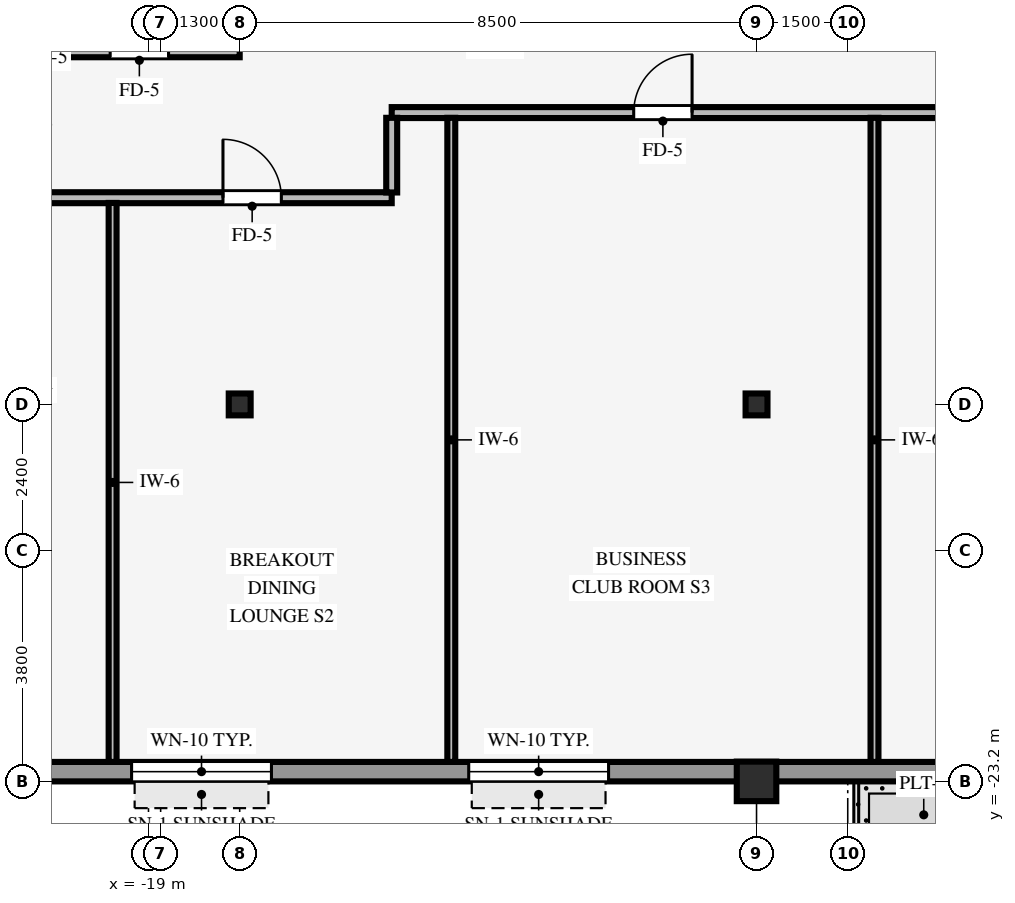
"""IFC4 building model, lengths in metres.
Left out: names, types, materials, properties, quantities, classifications, styles, units other than length and angle.
Written with IfcOpenShell. Run it as: python <this file> out.ifc"""

import sys

from ifc_helpers import new_model, si_unit, direction, frame, frame_2d, origin, origin_2d, place, context, subcontext, project, spatial, rectangle, hollow_rectangle, i_section, extrude, source, transform, mapped, element, fill, save


model = new_model("IFC4")
c1 = context("Model", 3, precision=1e-05, world=origin(), true_north=direction((0.0, 1.0)))
c2 = subcontext(c1, "Body", "Model", "MODEL_VIEW")
j1 = project(units=[si_unit("LENGTHUNIT", "METRE"), si_unit("PLANEANGLEUNIT", "RADIAN")], contexts=[c1])
p1 = place(None, origin())
s1 = spatial("IfcSite", under=j1, at=p1, CompositionType="ELEMENT")
p2 = place(p1, origin())
s2 = spatial("IfcBuilding", under=s1, at=p2, CompositionType="ELEMENT")
p3 = place(p2, frame((0.0, 0.0, 101.95)))
s3 = spatial("IfcBuildingStorey", under=s2, at=p3, CompositionType="ELEMENT", Elevation=101.95)
p4 = place(p3, frame((-9.0, -23.2, 0.0), z_axis=(0.0, 0.0, 1.0), x_axis=(1.0, 0.0, 0.0)))
e1 = element("IfcColumn", 1, at=p4, inside=s3, PredefinedType="COLUMN", context=c2, shape_type="SweptSolid", body=[
    extrude(hollow_rectangle(XDim=0.65, YDim=0.65, WallThickness=0.04, InnerFilletRadius=0.04, OuterFilletRadius=0.08, at=origin_2d()), origin(), (0.0, 0.0, 1.0), 3.37),
])
for number, where, z_axis, x_axis in (
    (2, (-17.5, -17.0, 0.0), (0.0, 0.0, 1.0), (1.0, 0.0, 0.0)),
    (3, (-9.0, -17.0, 0.0), (0.0, 0.0, 1.0), (1.0, 0.0, 0.0)),
):
    element("IfcColumn", number, at=place(p3, frame(where, z_axis=z_axis, x_axis=x_axis)), inside=s3, PredefinedType="COLUMN", context=c2, shape_type="SweptSolid", body=[
        extrude(i_section(OverallWidth=0.36, OverallDepth=0.36, WebThickness=0.021, FlangeThickness=0.021, FilletRadius=0.018, at=origin_2d()), origin(), (0.0, 0.0, 1.0), 3.37),
    ])
p5 = place(p3, frame((-21.9, -23.04, 0.0), z_axis=(0.0, 0.0, 1.0), x_axis=(1.0, 0.0, 0.0)))
e4 = element("IfcWall", 4, at=p5, inside=s3, PredefinedType="STANDARD", context=c2, shape_type="SweptSolid", body=[
    extrude(rectangle(XDim=43.8, YDim=0.32, at=frame_2d((21.9, 0.0))), origin(), (0.0, 0.0, 1.0), 2.705),
])
p6 = place(p5, frame((17.58, 0.0, 0.0), z_axis=(0.0, 0.0, 1.0), x_axis=(-1.0, 0.0, 0.0)))
e5 = element("IfcOpeningElement", 5, at=p6, cuts=e4, PredefinedType="OPENING", context=c2, shape_type="SweptSolid", body=[
    extrude(rectangle(XDim=0.98, YDim=2.15, at=frame_2d((0.49, 1.075))), frame((0.0, 0.17, 0.0), z_axis=(0.0, -1.0, 0.0), x_axis=(1.0, 0.0, 0.0)), (0.0, 0.0, 1.0), 0.34),
])
p7 = place(p5, frame((2.622, 0.0, 0.8)))
e6 = element("IfcOpeningElement", 6, at=p7, cuts=e4, PredefinedType="OPENING", context=c2, shape_type="SweptSolid", body=[
    extrude(rectangle(XDim=2.3, YDim=1.62, at=frame_2d((1.15, 0.81))), frame((0.0, 0.17, 0.0), z_axis=(0.0, -1.0, 0.0), x_axis=(1.0, 0.0, 0.0)), (0.0, 0.0, 1.0), 0.34),
])
p8 = place(p5, frame((8.167, 0.0, 0.8)))
e7 = element("IfcOpeningElement", 7, at=p8, cuts=e4, PredefinedType="OPENING", context=c2, shape_type="SweptSolid", body=[
    extrude(rectangle(XDim=2.3, YDim=1.62, at=frame_2d((1.15, 0.81))), frame((0.0, 0.17, 0.0), z_axis=(0.0, -1.0, 0.0), x_axis=(1.0, 0.0, 0.0)), (0.0, 0.0, 1.0), 0.34),
])
p9 = place(p5, frame((24.044, 0.0, 0.8)))
e8 = element("IfcOpeningElement", 8, at=p9, cuts=e4, PredefinedType="OPENING", context=c2, shape_type="SweptSolid", body=[
    extrude(rectangle(XDim=2.3, YDim=1.62, at=frame_2d((1.15, 0.81))), frame((0.0, 0.17, 0.0), z_axis=(0.0, -1.0, 0.0), x_axis=(1.0, 0.0, 0.0)), (0.0, 0.0, 1.0), 0.34),
])
p10 = place(p5, frame((34.233, 0.0, 0.8)))
e9 = element("IfcOpeningElement", 9, at=p10, cuts=e4, PredefinedType="OPENING", context=c2, shape_type="SweptSolid", body=[
    extrude(rectangle(XDim=2.3, YDim=1.62, at=frame_2d((1.15, 0.81))), frame((0.0, 0.17, 0.0), z_axis=(0.0, -1.0, 0.0), x_axis=(1.0, 0.0, 0.0)), (0.0, 0.0, 1.0), 0.34),
])
p11 = place(p5, frame((38.878, 0.0, 0.8)))
e10 = element("IfcOpeningElement", 10, at=p11, cuts=e4, PredefinedType="OPENING", context=c2, shape_type="SweptSolid", body=[
    extrude(rectangle(XDim=2.3, YDim=1.62, at=frame_2d((1.15, 0.81))), frame((0.0, 0.17, 0.0), z_axis=(0.0, -1.0, 0.0), x_axis=(1.0, 0.0, 0.0)), (0.0, 0.0, 1.0), 0.34),
])
p12 = place(p3, frame((-20.8, -13.6, 0.0), z_axis=(0.0, 0.0, 1.0), x_axis=(1.0, 0.0, 0.0)))
e11 = element("IfcWall", 11, at=p12, inside=s3, PredefinedType="PARTITIONING", context=c2, shape_type="SweptSolid", body=[
    extrude(rectangle(XDim=5.8, YDim=0.18, at=frame_2d((2.9, 0.0))), origin(), (0.0, 0.0, 1.0), 2.998),
])
p13 = place(p12, frame((3.025, 0.0, 0.0)))
e12 = element("IfcOpeningElement", 12, at=p13, cuts=e11, PredefinedType="OPENING", context=c2, shape_type="SweptSolid", body=[
    extrude(rectangle(XDim=0.96, YDim=2.1, at=frame_2d((0.48, 1.05))), frame((0.0, 0.1, 0.0), z_axis=(0.0, -1.0, 0.0), x_axis=(1.0, 0.0, 0.0)), (0.0, 0.0, 1.0), 0.2),
])
p14 = place(p3, frame((-15.0, -12.2, 0.0), z_axis=(0.0, 0.0, 1.0), x_axis=(1.0, 0.0, 0.0)))
e13 = element("IfcWall", 13, at=p14, inside=s3, PredefinedType="PARTITIONING", context=c2, shape_type="SweptSolid", body=[
    extrude(rectangle(XDim=30.0, YDim=0.18, at=frame_2d((15.0, 0.0))), origin(), (0.0, 0.0, 1.0), 3.36),
])
p15 = place(p14, frame((3.98, 0.0, 0.0)))
e14 = element("IfcOpeningElement", 14, at=p15, cuts=e13, PredefinedType="OPENING", context=c2, shape_type="SweptSolid", body=[
    extrude(rectangle(XDim=0.96, YDim=2.1, at=frame_2d((0.48, 1.05))), frame((0.0, 0.1, 0.0), z_axis=(0.0, -1.0, 0.0), x_axis=(1.0, 0.0, 0.0)), (0.0, 0.0, 1.0), 0.2),
])
p16 = place(p14, frame((16.695, 0.0, 0.0)))
e15 = element("IfcOpeningElement", 15, at=p16, cuts=e13, PredefinedType="OPENING", context=c2, shape_type="SweptSolid", body=[
    extrude(rectangle(XDim=0.96, YDim=2.1, at=frame_2d((0.48, 1.05))), frame((0.0, 0.1, 0.0), z_axis=(0.0, -1.0, 0.0), x_axis=(1.0, 0.0, 0.0)), (0.0, 0.0, 1.0), 0.2),
])
p17 = place(p14, frame((22.15, 0.0, 0.0)))
e16 = element("IfcOpeningElement", 16, at=p17, cuts=e13, PredefinedType="OPENING", context=c2, shape_type="SweptSolid", body=[
    extrude(rectangle(XDim=0.96, YDim=2.1, at=frame_2d((0.48, 1.05))), frame((0.0, 0.1, 0.0), z_axis=(0.0, -1.0, 0.0), x_axis=(1.0, 0.0, 0.0)), (0.0, 0.0, 1.0), 0.2),
])
p18 = place(p14, frame((27.075, 0.0, 0.0)))
e17 = element("IfcOpeningElement", 17, at=p18, cuts=e13, PredefinedType="OPENING", context=c2, shape_type="SweptSolid", body=[
    extrude(rectangle(XDim=0.96, YDim=2.1, at=frame_2d((0.48, 1.05))), frame((0.0, 0.1, 0.0), z_axis=(0.0, -1.0, 0.0), x_axis=(1.0, 0.0, 0.0)), (0.0, 0.0, 1.0), 0.2),
])
p19 = place(p14, frame((9.39, 0.0, 0.0)))
e18 = element("IfcOpeningElement", 18, at=p19, cuts=e13, PredefinedType="OPENING", context=c2, shape_type="SweptSolid", body=[
    extrude(rectangle(XDim=0.96, YDim=2.1, at=frame_2d((0.48, 1.05))), frame((0.0, 0.1, 0.0), z_axis=(0.0, -1.0, 0.0), x_axis=(1.0, 0.0, 0.0)), (0.0, 0.0, 1.0), 0.2),
])
p20 = place(p3, frame((-23.68, -11.2, 0.0), z_axis=(0.0, 0.0, 1.0), x_axis=(1.0, 0.0, 0.0)))
e19 = element("IfcWall", 19, at=p20, inside=s3, PredefinedType="PARTITIONING", context=c2, shape_type="SweptSolid", body=[
    extrude(rectangle(XDim=6.18, YDim=0.18, at=frame_2d((3.09, 0.0))), origin(), (0.0, 0.0, 1.0), 3.36),
])
p21 = place(p20, frame((4.05, 0.0, 0.0)))
e20 = element("IfcOpeningElement", 20, at=p21, cuts=e19, PredefinedType="OPENING", context=c2, shape_type="SweptSolid", body=[
    extrude(rectangle(XDim=0.96, YDim=2.1, at=frame_2d((0.48, 1.05))), frame((0.0, 0.1, 0.0), z_axis=(0.0, -1.0, 0.0), x_axis=(1.0, 0.0, 0.0)), (0.0, 0.0, 1.0), 0.2),
])
p22 = place(p3, frame((-19.59, -22.88, 0.0), z_axis=(0.0, 0.0, 1.0), x_axis=(0.0, 1.0, 0.0)))
e21 = element("IfcWall", 21, at=p22, inside=s3, PredefinedType="PARTITIONING", context=c2, shape_type="SweptSolid", body=[
    extrude(rectangle(XDim=9.194, YDim=0.13, at=frame_2d((4.597, 0.0))), origin(), (0.0, 0.0, 1.0), 3.36),
])
p23 = place(p3, frame((-15.0, -13.514, 0.0), z_axis=(0.0, 0.0, 1.0), x_axis=(0.0, 1.0, 0.0)))
e22 = element("IfcWall", 22, at=p23, inside=s3, PredefinedType="PARTITIONING", context=c2, shape_type="SweptSolid", body=[
    extrude(rectangle(XDim=1.228, YDim=0.18, at=frame_2d((0.614, 0.0))), origin(), (0.0, 0.0, 1.0), 3.36),
])
for number, where, z_axis, x_axis in (
    (23, (-14.02, -22.88, 0.0), (0.0, 0.0, 1.0), (0.0, 1.0, 0.0)),
    (24, (-7.06, -22.88, 0.0), (0.0, 0.0, 1.0), (0.0, 1.0, 0.0)),
):
    element("IfcWall", number, at=place(p3, frame(where, z_axis=z_axis, x_axis=x_axis)), inside=s3, PredefinedType="PARTITIONING", context=c2, shape_type="SweptSolid", body=[
        extrude(rectangle(XDim=10.594, YDim=0.13, at=frame_2d((5.297, 0.0))), origin(), (0.0, 0.0, 1.0), 3.36),
    ])
m1 = source(origin(), c2, "Body", "SweptSolid", [
    extrude(rectangle(XDim=2.3, YDim=1.62, at=frame_2d((1.15, 0.81))), frame((0.0, 0.03, 0.0), z_axis=(0.0, -1.0, 0.0), x_axis=(1.0, 0.0, 0.0)), (0.0, 0.0, 1.0), 0.06),
])
p24 = place(p7, origin())
e25 = element("IfcWindow", 25, at=p24, inside=s3, PartitioningType="SINGLE_PANEL", PredefinedType="WINDOW", context=c2, shape_type="MappedRepresentation", body=[
    mapped(m1, transform((0.0, 0.0, 0.0), scale=1.0)),
])
fill(e6, e25)
p25 = place(p8, origin())
e26 = element("IfcWindow", 26, at=p25, inside=s3, PartitioningType="SINGLE_PANEL", PredefinedType="WINDOW", context=c2, shape_type="MappedRepresentation", body=[
    mapped(m1, transform((0.0, 0.0, 0.0), scale=1.0)),
])
fill(e7, e26)
m2 = source(origin(), c2, "Body", "SweptSolid", [
    extrude(rectangle(XDim=0.96, YDim=2.1, at=frame_2d((0.48, 1.05))), frame((0.0, 0.025, 0.0), z_axis=(0.0, -1.0, 0.0), x_axis=(1.0, 0.0, 0.0)), (0.0, 0.0, 1.0), 0.05),
])
p26 = place(p15, origin())
e27 = element("IfcDoor", 27, at=p26, inside=s3, OperationType="SINGLE_SWING_RIGHT", PredefinedType="DOOR", context=c2, shape_type="MappedRepresentation", body=[
    mapped(m2, transform((0.0, 0.0, 0.0), scale=1.0)),
])
fill(e14, e27)
p27 = place(p13, origin())
e28 = element("IfcDoor", 28, at=p27, inside=s3, OperationType="SINGLE_SWING_LEFT", PredefinedType="DOOR", context=c2, shape_type="MappedRepresentation", body=[
    mapped(m2, transform((0.0, 0.0, 0.0), scale=1.0)),
])
fill(e12, e28)
p28 = place(p21, origin())
e29 = element("IfcDoor", 29, at=p28, inside=s3, OperationType="SINGLE_SWING_LEFT", PredefinedType="DOOR", context=c2, shape_type="MappedRepresentation", body=[
    mapped(m2, transform((0.0, 0.0, 0.0), scale=1.0)),
])
fill(e20, e29)
save(model, sys.argv[1])
